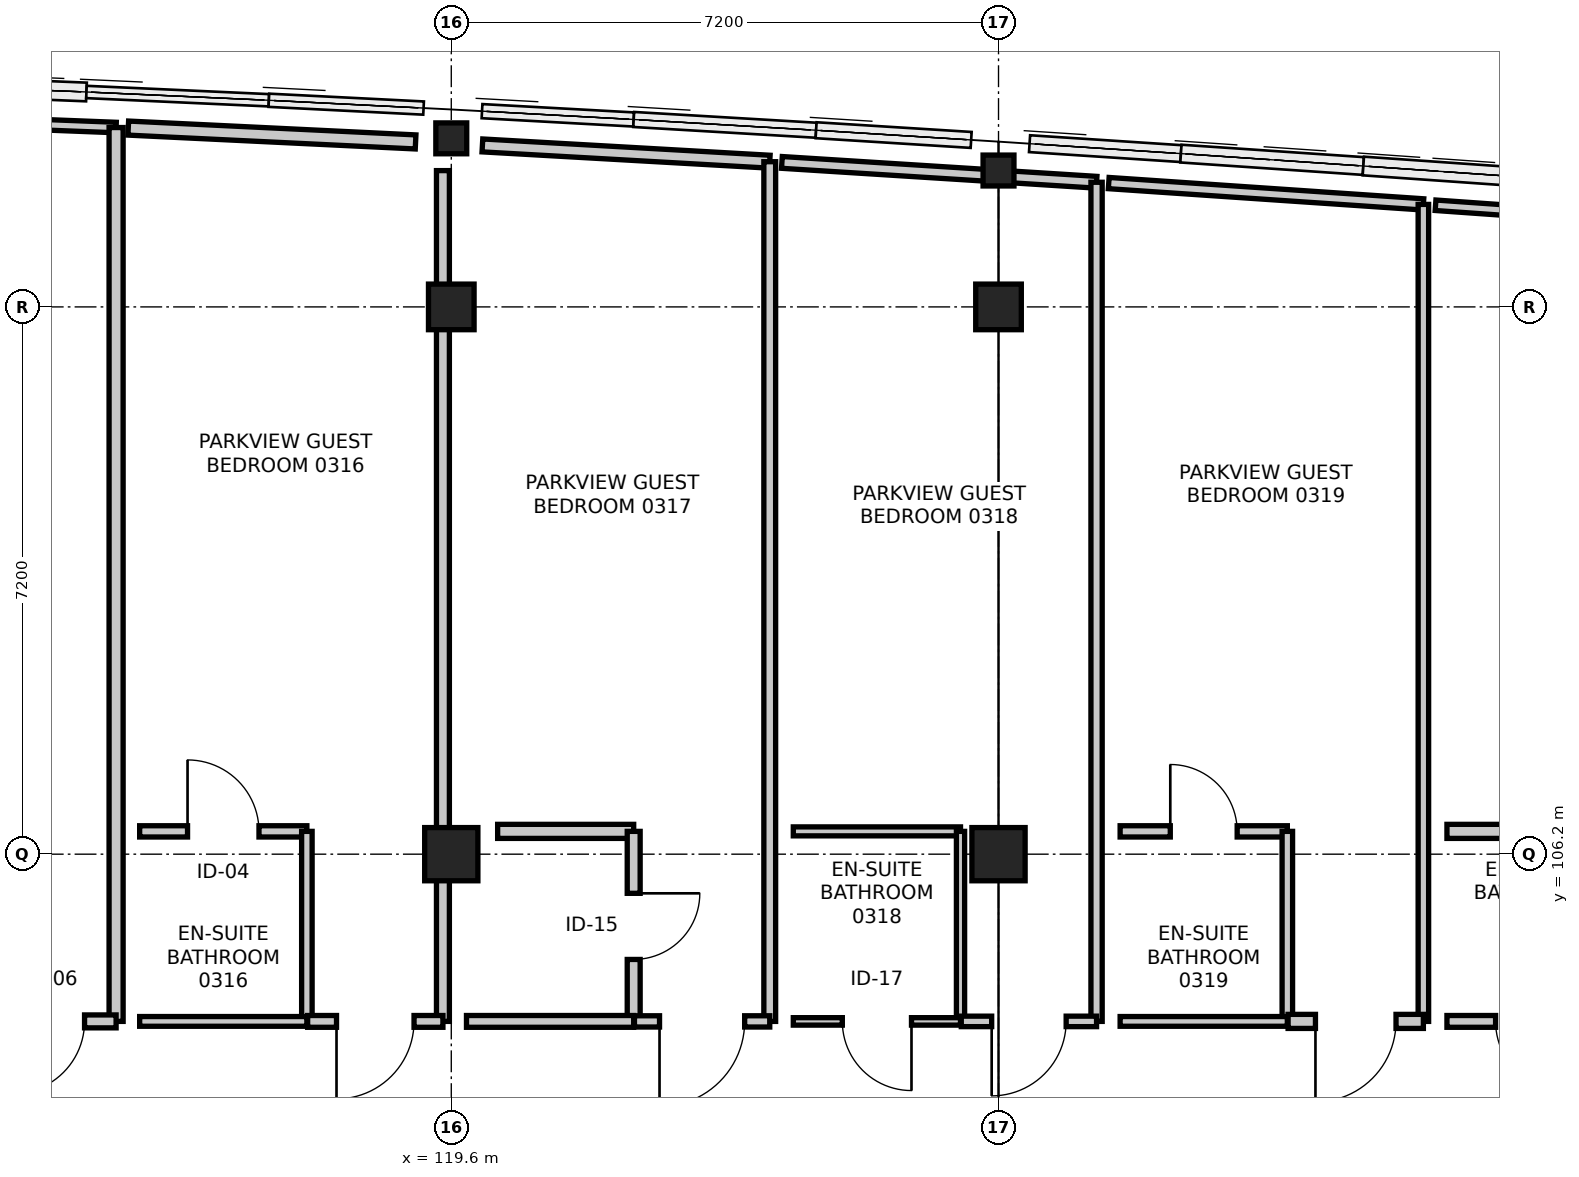
"""IFC4 building model, lengths in metres.
Left out: names, types, materials, properties, quantities, classifications, styles, units other than length and angle.
Written with IfcOpenShell. Run it as: python <this file> out.ifc"""

import sys

from ifc_helpers import new_model, si_unit, direction, frame, frame_2d, origin, origin_2d, place, context, subcontext, project, spatial, rectangle, hollow_circle, extrude, element, fill, save


model = new_model("IFC4")
c1 = context("Model", 3, precision=1e-05, world=origin(), true_north=direction((0.0, 1.0)))
c2 = subcontext(c1, "Body", "Model", "MODEL_VIEW")
j1 = project(units=[si_unit("LENGTHUNIT", "METRE"), si_unit("PLANEANGLEUNIT", "RADIAN")], contexts=[c1])
p1 = place(None, origin())
s1 = spatial("IfcSite", under=j1, at=p1, CompositionType="ELEMENT")
p2 = place(p1, origin())
s2 = spatial("IfcBuilding", under=s1, at=p2, CompositionType="ELEMENT")
p3 = place(p2, frame((0.0, 0.0, 15.0)))
s3 = spatial("IfcBuildingStorey", under=s2, at=p3, CompositionType="ELEMENT", Elevation=15.0)
p4 = place(p3, frame((119.6, 106.2, 0.0), z_axis=(0.0, 0.0, 1.0), x_axis=(1.0, 0.0, 0.0)))
e1 = element("IfcColumn", 1, at=p4, inside=s3, PredefinedType="COLUMN", context=c2, shape_type="SweptSolid", body=[
    extrude(rectangle(XDim=0.7, YDim=0.7, at=origin_2d()), origin(), (0.0, 0.0, 1.0), 4.2),
])
p5 = place(p3, frame((119.6, 113.4, 0.0), z_axis=(0.0, 0.0, 1.0), x_axis=(1.0, 0.0, 0.0)))
e2 = element("IfcColumn", 2, at=p5, inside=s3, PredefinedType="COLUMN", context=c2, shape_type="SweptSolid", body=[
    extrude(rectangle(XDim=0.6, YDim=0.6, at=origin_2d()), origin(), (0.0, 0.0, 1.0), 4.2),
])
p6 = place(p3, frame((119.6, 115.618, 0.0), z_axis=(0.0, 0.0, 1.0), x_axis=(1.0, 0.0, 0.0)))
e3 = element("IfcColumn", 3, at=p6, inside=s3, PredefinedType="COLUMN", context=c2, shape_type="SweptSolid", body=[
    extrude(hollow_circle(Radius=0.203, WallThickness=0.02, at=origin_2d()), origin(), (0.0, 0.0, 1.0), 4.2),
])
p7 = place(p3, frame((126.8, 106.2, 0.0), z_axis=(0.0, 0.0, 1.0), x_axis=(1.0, 0.0, 0.0)))
e4 = element("IfcColumn", 4, at=p7, inside=s3, PredefinedType="COLUMN", context=c2, shape_type="SweptSolid", body=[
    extrude(rectangle(XDim=0.7, YDim=0.7, at=origin_2d()), origin(), (0.0, 0.0, 1.0), 4.2),
])
p8 = place(p3, frame((126.8, 113.4, 0.0), z_axis=(0.0, 0.0, 1.0), x_axis=(1.0, 0.0, 0.0)))
e5 = element("IfcColumn", 5, at=p8, inside=s3, PredefinedType="COLUMN", context=c2, shape_type="SweptSolid", body=[
    extrude(rectangle(XDim=0.6, YDim=0.6, at=origin_2d()), origin(), (0.0, 0.0, 1.0), 4.2),
])
p9 = place(p3, frame((126.8, 115.194, 0.0), z_axis=(0.0, 0.0, 1.0), x_axis=(1.0, 0.0, 0.0)))
e6 = element("IfcColumn", 6, at=p9, inside=s3, PredefinedType="COLUMN", context=c2, shape_type="SweptSolid", body=[
    extrude(hollow_circle(Radius=0.203, WallThickness=0.02, at=origin_2d()), origin(), (0.0, 0.0, 1.0), 4.2),
])
p10 = place(p3, frame((111.05, 115.921, 0.0), z_axis=(0.0, 0.0, 1.0), x_axis=(0.999245687705, -0.038833691584, 0.0)))
e7 = element("IfcWall", 7, at=p10, inside=s3, PredefinedType="PARTITIONING", context=c2, shape_type="SweptSolid", body=[
    extrude(rectangle(XDim=4.143, YDim=0.138, at=frame_2d((2.072, 0.0))), origin(), (0.0, 0.0, 1.0), 3.516),
])
p11 = place(p3, frame((115.19, 115.76, 0.0), z_axis=(0.0, 0.0, 1.0), x_axis=(0.0, -1.0, 0.0)))
e8 = element("IfcWall", 8, at=p11, inside=s3, PredefinedType="PARTITIONING", context=c2, shape_type="SweptSolid", body=[
    extrude(rectangle(XDim=11.76, YDim=0.185, at=frame_2d((5.88, 0.0))), origin(), (0.0, 0.0, 1.0), 3.325),
])
p12 = place(p3, frame((115.19, 104.0, 0.0), z_axis=(0.0, 0.0, 1.0), x_axis=(-1.0, 0.0, 0.0)))
e9 = element("IfcWall", 9, at=p12, inside=s3, PredefinedType="PARTITIONING", context=c2, shape_type="SweptSolid", body=[
    extrude(rectangle(XDim=1.78, YDim=0.17, at=frame_2d((0.89, 0.0))), origin(), (0.0, 0.0, 1.0), 3.94),
])
p13 = place(p12, frame((0.415, 0.0, 0.0)))
e10 = element("IfcOpeningElement", 10, at=p13, cuts=e9, PredefinedType="OPENING", context=c2, shape_type="SweptSolid", body=[
    extrude(rectangle(XDim=0.95, YDim=2.1, at=frame_2d((0.475, 1.05))), frame((0.0, 0.095, 0.0), z_axis=(0.0, -1.0, 0.0), x_axis=(1.0, 0.0, 0.0)), (0.0, 0.0, 1.0), 0.19),
])
p14 = place(p3, frame((115.5, 106.5, 0.0), z_axis=(0.0, 0.0, 1.0), x_axis=(1.0, 0.0, 0.0)))
e11 = element("IfcWall", 11, at=p14, inside=s3, PredefinedType="PARTITIONING", context=c2, shape_type="SweptSolid", body=[
    extrude(rectangle(XDim=2.2, YDim=0.148, at=frame_2d((1.1, 0.0))), origin(), (0.0, 0.0, 1.0), 3.94),
])
p15 = place(p14, frame((0.63, 0.0, 0.0)))
e12 = element("IfcOpeningElement", 12, at=p15, cuts=e11, PredefinedType="OPENING", context=c2, shape_type="SweptSolid", body=[
    extrude(rectangle(XDim=0.94, YDim=2.12, at=frame_2d((0.47, 1.06))), frame((0.0, 0.084, 0.0), z_axis=(0.0, -1.0, 0.0), x_axis=(1.0, 0.0, 0.0)), (0.0, 0.0, 1.0), 0.168),
])
p16 = place(p3, frame((117.7, 106.5, 0.0), z_axis=(0.0, 0.0, 1.0), x_axis=(0.0, -1.0, 0.0)))
e13 = element("IfcWall", 13, at=p16, inside=s3, PredefinedType="PARTITIONING", context=c2, shape_type="SweptSolid", body=[
    extrude(rectangle(XDim=2.5, YDim=0.138, at=frame_2d((1.25, 0.0))), origin(), (0.0, 0.0, 1.0), 3.325),
])
p17 = place(p3, frame((117.7, 104.0, 0.0), z_axis=(0.0, 0.0, 1.0), x_axis=(-1.0, 0.0, 0.0)))
e14 = element("IfcWall", 14, at=p17, inside=s3, PredefinedType="PARTITIONING", context=c2, shape_type="SweptSolid", body=[
    extrude(rectangle(XDim=2.2, YDim=0.128, at=frame_2d((1.1, 0.0))), origin(), (0.0, 0.0, 1.0), 3.94),
])
p18 = place(p3, frame((115.35, 115.753, 0.0), z_axis=(0.0, 0.0, 1.0), x_axis=(0.99884141987, -0.048122946217, 0.0)))
e15 = element("IfcWall", 15, at=p18, inside=s3, PredefinedType="PARTITIONING", context=c2, shape_type="SweptSolid", body=[
    extrude(rectangle(XDim=3.785, YDim=0.185, at=frame_2d((1.892, 0.0))), origin(), (0.0, 0.0, 1.0), 3.516),
])
p19 = place(p3, frame((119.49, 115.193, 0.0), z_axis=(0.0, 0.0, 1.0), x_axis=(0.0, -1.0, 0.0)))
e16 = element("IfcWall", 16, at=p19, inside=s3, PredefinedType="PARTITIONING", context=c2, shape_type="SweptSolid", body=[
    extrude(rectangle(XDim=11.193, YDim=0.17, at=frame_2d((5.597, 0.0))), origin(), (0.0, 0.0, 1.0), 3.275),
])
p20 = place(p3, frame((119.49, 104.0, 0.0), z_axis=(0.0, 0.0, 1.0), x_axis=(-1.0, 0.0, 0.0)))
e17 = element("IfcWall", 17, at=p20, inside=s3, PredefinedType="PARTITIONING", context=c2, shape_type="SweptSolid", body=[
    extrude(rectangle(XDim=1.78, YDim=0.155, at=frame_2d((0.89, 0.0))), origin(), (0.0, 0.0, 1.0), 3.275),
])
p21 = place(p20, frame((0.38, 0.0, 0.0)))
e18 = element("IfcOpeningElement", 18, at=p21, cuts=e17, PredefinedType="OPENING", context=c2, shape_type="SweptSolid", body=[
    extrude(rectangle(XDim=1.02, YDim=2.15, at=frame_2d((0.51, 1.075))), frame((0.0, 0.087, 0.0), z_axis=(0.0, -1.0, 0.0), x_axis=(1.0, 0.0, 0.0)), (0.0, 0.0, 1.0), 0.175),
])
p22 = place(p3, frame((120.21, 106.5, 0.0), z_axis=(0.0, 0.0, 1.0), x_axis=(1.0, 0.0, 0.0)))
e19 = element("IfcWall", 19, at=p22, inside=s3, PredefinedType="PARTITIONING", context=c2, shape_type="SweptSolid", body=[
    extrude(rectangle(XDim=1.79, YDim=0.185, at=frame_2d((0.895, 0.0))), origin(), (0.0, 0.0, 1.0), 3.325),
])
p23 = place(p3, frame((122.0, 106.5, 0.0), z_axis=(0.0, 0.0, 1.0), x_axis=(0.0, -1.0, 0.0)))
e20 = element("IfcWall", 20, at=p23, inside=s3, PredefinedType="PARTITIONING", context=c2, shape_type="SweptSolid", body=[
    extrude(rectangle(XDim=2.5, YDim=0.17, at=frame_2d((1.25, 0.0))), origin(), (0.0, 0.0, 1.0), 3.325),
])
p24 = place(p23, frame((0.815, 0.0, 0.0)))
e21 = element("IfcOpeningElement", 21, at=p24, cuts=e20, PredefinedType="OPENING", context=c2, shape_type="SweptSolid", body=[
    extrude(rectangle(XDim=0.87, YDim=2.07, at=frame_2d((0.435, 1.035))), frame((0.0, 0.095, 0.0), z_axis=(0.0, -1.0, 0.0), x_axis=(1.0, 0.0, 0.0)), (0.0, 0.0, 1.0), 0.19),
])
p25 = place(p3, frame((122.0, 104.0, 0.0), z_axis=(0.0, 0.0, 1.0), x_axis=(-1.0, 0.0, 0.0)))
e22 = element("IfcWall", 22, at=p25, inside=s3, PredefinedType="PARTITIONING", context=c2, shape_type="SweptSolid", body=[
    extrude(rectangle(XDim=2.2, YDim=0.155, at=frame_2d((1.1, 0.0))), origin(), (0.0, 0.0, 1.0), 3.275),
])
p26 = place(p3, frame((120.01, 115.524, 0.0), z_axis=(0.0, 0.0, 1.0), x_axis=(0.998400060611, -0.056544840372, 0.0)))
e23 = element("IfcWall", 23, at=p26, inside=s3, PredefinedType="PARTITIONING", context=c2, shape_type="SweptSolid", body=[
    extrude(rectangle(XDim=3.787, YDim=0.17, at=frame_2d((1.893, 0.0))), origin(), (0.0, 0.0, 1.0), 3.516),
])
p27 = place(p3, frame((123.79, 115.31, 0.0), z_axis=(0.0, 0.0, 1.0), x_axis=(0.0, -1.0, 0.0)))
e24 = element("IfcWall", 24, at=p27, inside=s3, PredefinedType="PARTITIONING", context=c2, shape_type="SweptSolid", body=[
    extrude(rectangle(XDim=11.31, YDim=0.155, at=frame_2d((5.655, 0.0))), origin(), (0.0, 0.0, 1.0), 3.325),
])
p28 = place(p3, frame((123.79, 104.0, 0.0), z_axis=(0.0, 0.0, 1.0), x_axis=(-1.0, 0.0, 0.0)))
e25 = element("IfcWall", 25, at=p28, inside=s3, PredefinedType="PARTITIONING", context=c2, shape_type="SweptSolid", body=[
    extrude(rectangle(XDim=1.78, YDim=0.148, at=frame_2d((0.89, 0.0))), origin(), (0.0, 0.0, 1.0), 3.94),
])
p29 = place(p28, frame((0.33, 0.0, 0.0)))
e26 = element("IfcOpeningElement", 26, at=p29, cuts=e25, PredefinedType="OPENING", context=c2, shape_type="SweptSolid", body=[
    extrude(rectangle(XDim=1.12, YDim=2.2, at=frame_2d((0.56, 1.1))), frame((0.0, 0.084, 0.0), z_axis=(0.0, -1.0, 0.0), x_axis=(1.0, 0.0, 0.0)), (0.0, 0.0, 1.0), 0.168),
])
p30 = place(p3, frame((124.1, 106.5, 0.0), z_axis=(0.0, 0.0, 1.0), x_axis=(1.0, 0.0, 0.0)))
e27 = element("IfcWall", 27, at=p30, inside=s3, PredefinedType="PARTITIONING", context=c2, shape_type="SweptSolid", body=[
    extrude(rectangle(XDim=2.2, YDim=0.118, at=frame_2d((1.1, 0.0))), origin(), (0.0, 0.0, 1.0), 3.94),
])
p31 = place(p3, frame((126.3, 106.5, 0.0), z_axis=(0.0, 0.0, 1.0), x_axis=(0.0, -1.0, 0.0)))
e28 = element("IfcWall", 28, at=p31, inside=s3, PredefinedType="PARTITIONING", context=c2, shape_type="SweptSolid", body=[
    extrude(rectangle(XDim=2.5, YDim=0.108, at=frame_2d((1.25, 0.0))), origin(), (0.0, 0.0, 1.0), 3.325),
])
p32 = place(p3, frame((126.3, 104.0, 0.0), z_axis=(0.0, 0.0, 1.0), x_axis=(-1.0, 0.0, 0.0)))
e29 = element("IfcWall", 29, at=p32, inside=s3, PredefinedType="PARTITIONING", context=c2, shape_type="SweptSolid", body=[
    extrude(rectangle(XDim=2.2, YDim=0.098, at=frame_2d((1.1, 0.0))), origin(), (0.0, 0.0, 1.0), 3.94),
])
p33 = place(p32, frame((0.645, 0.0, 0.0)))
e30 = element("IfcOpeningElement", 30, at=p33, cuts=e29, PredefinedType="OPENING", context=c2, shape_type="SweptSolid", body=[
    extrude(rectangle(XDim=0.91, YDim=2.11, at=frame_2d((0.455, 1.055))), frame((0.0, 0.059, 0.0), z_axis=(0.0, -1.0, 0.0), x_axis=(1.0, 0.0, 0.0)), (0.0, 0.0, 1.0), 0.118),
])
p34 = place(p3, frame((123.95, 115.301, 0.0), z_axis=(0.0, 0.0, 1.0), x_axis=(0.998019001465, -0.062913215743, 0.0)))
e31 = element("IfcWall", 31, at=p34, inside=s3, PredefinedType="PARTITIONING", context=c2, shape_type="SweptSolid", body=[
    extrude(rectangle(XDim=4.148, YDim=0.155, at=frame_2d((2.074, 0.0))), origin(), (0.0, 0.0, 1.0), 3.516),
])
p35 = place(p3, frame((128.09, 115.04, 0.0), z_axis=(0.0, 0.0, 1.0), x_axis=(0.0, -1.0, 0.0)))
e32 = element("IfcWall", 32, at=p35, inside=s3, PredefinedType="PARTITIONING", context=c2, shape_type="SweptSolid", body=[
    extrude(rectangle(XDim=11.04, YDim=0.148, at=frame_2d((5.52, 0.0))), origin(), (0.0, 0.0, 1.0), 3.325),
])
p36 = place(p3, frame((128.09, 104.0, 0.0), z_axis=(0.0, 0.0, 1.0), x_axis=(-1.0, 0.0, 0.0)))
e33 = element("IfcWall", 33, at=p36, inside=s3, PredefinedType="PARTITIONING", context=c2, shape_type="SweptSolid", body=[
    extrude(rectangle(XDim=1.78, YDim=0.138, at=frame_2d((0.89, 0.0))), origin(), (0.0, 0.0, 1.0), 3.275),
])
p37 = place(p36, frame((0.4, 0.0, 0.0)))
e34 = element("IfcOpeningElement", 34, at=p37, cuts=e33, PredefinedType="OPENING", context=c2, shape_type="SweptSolid", body=[
    extrude(rectangle(XDim=0.98, YDim=2.15, at=frame_2d((0.49, 1.075))), frame((0.0, 0.079, 0.0), z_axis=(0.0, -1.0, 0.0), x_axis=(1.0, 0.0, 0.0)), (0.0, 0.0, 1.0), 0.158),
])
p38 = place(p3, frame((128.4, 106.5, 0.0), z_axis=(0.0, 0.0, 1.0), x_axis=(1.0, 0.0, 0.0)))
e35 = element("IfcWall", 35, at=p38, inside=s3, PredefinedType="PARTITIONING", context=c2, shape_type="SweptSolid", body=[
    extrude(rectangle(XDim=2.2, YDim=0.148, at=frame_2d((1.1, 0.0))), origin(), (0.0, 0.0, 1.0), 3.94),
])
p39 = place(p38, frame((0.66, 0.0, 0.0)))
e36 = element("IfcOpeningElement", 36, at=p39, cuts=e35, PredefinedType="OPENING", context=c2, shape_type="SweptSolid", body=[
    extrude(rectangle(XDim=0.88, YDim=2.06, at=frame_2d((0.44, 1.03))), frame((0.0, 0.084, 0.0), z_axis=(0.0, -1.0, 0.0), x_axis=(1.0, 0.0, 0.0)), (0.0, 0.0, 1.0), 0.168),
])
p40 = place(p3, frame((130.6, 106.5, 0.0), z_axis=(0.0, 0.0, 1.0), x_axis=(0.0, -1.0, 0.0)))
e37 = element("IfcWall", 37, at=p40, inside=s3, PredefinedType="PARTITIONING", context=c2, shape_type="SweptSolid", body=[
    extrude(rectangle(XDim=2.5, YDim=0.138, at=frame_2d((1.25, 0.0))), origin(), (0.0, 0.0, 1.0), 3.325),
])
p41 = place(p3, frame((130.6, 104.0, 0.0), z_axis=(0.0, 0.0, 1.0), x_axis=(-1.0, 0.0, 0.0)))
e38 = element("IfcWall", 38, at=p41, inside=s3, PredefinedType="PARTITIONING", context=c2, shape_type="SweptSolid", body=[
    extrude(rectangle(XDim=2.2, YDim=0.128, at=frame_2d((1.1, 0.0))), origin(), (0.0, 0.0, 1.0), 3.94),
])
p42 = place(p3, frame((128.25, 115.029, 0.0), z_axis=(0.0, 0.0, 1.0), x_axis=(0.997708221266, -0.067663174763, 0.0)))
e39 = element("IfcWall", 39, at=p42, inside=s3, PredefinedType="PARTITIONING", context=c2, shape_type="SweptSolid", body=[
    extrude(rectangle(XDim=4.149, YDim=0.148, at=frame_2d((2.075, 0.0))), origin(), (0.0, 0.0, 1.0), 3.516),
])
p43 = place(p3, frame((132.39, 114.749, 0.0), z_axis=(0.0, 0.0, 1.0), x_axis=(0.0, -1.0, 0.0)))
e40 = element("IfcWall", 40, at=p43, inside=s3, PredefinedType="PARTITIONING", context=c2, shape_type="SweptSolid", body=[
    extrude(rectangle(XDim=10.749, YDim=0.138, at=frame_2d((5.374, 0.0))), origin(), (0.0, 0.0, 1.0), 3.325),
])
p44 = place(p3, frame((132.39, 104.0, 0.0), z_axis=(0.0, 0.0, 1.0), x_axis=(-1.0, 0.0, 0.0)))
e41 = element("IfcWall", 41, at=p44, inside=s3, PredefinedType="PARTITIONING", context=c2, shape_type="SweptSolid", body=[
    extrude(rectangle(XDim=1.78, YDim=0.185, at=frame_2d((0.89, 0.0))), origin(), (0.0, 0.0, 1.0), 3.94),
])
p45 = place(p44, frame((0.36, 0.0, 0.0)))
e42 = element("IfcOpeningElement", 42, at=p45, cuts=e41, PredefinedType="OPENING", context=c2, shape_type="SweptSolid", body=[
    extrude(rectangle(XDim=1.06, YDim=2.2, at=frame_2d((0.53, 1.1))), frame((0.0, 0.103, 0.0), z_axis=(0.0, -1.0, 0.0), x_axis=(1.0, 0.0, 0.0)), (0.0, 0.0, 1.0), 0.205),
])
p46 = place(p3, frame((132.7, 106.5, 0.0), z_axis=(0.0, 0.0, 1.0), x_axis=(1.0, 0.0, 0.0)))
e43 = element("IfcWall", 43, at=p46, inside=s3, PredefinedType="PARTITIONING", context=c2, shape_type="SweptSolid", body=[
    extrude(rectangle(XDim=2.2, YDim=0.185, at=frame_2d((1.1, 0.0))), origin(), (0.0, 0.0, 1.0), 3.275),
])
p47 = place(p3, frame((134.9, 104.0, 0.0), z_axis=(0.0, 0.0, 1.0), x_axis=(-1.0, 0.0, 0.0)))
e44 = element("IfcWall", 44, at=p47, inside=s3, PredefinedType="PARTITIONING", context=c2, shape_type="SweptSolid", body=[
    extrude(rectangle(XDim=2.2, YDim=0.155, at=frame_2d((1.1, 0.0))), origin(), (0.0, 0.0, 1.0), 3.275),
])
p48 = place(p47, frame((0.64, 0.0, 0.0)))
e45 = element("IfcOpeningElement", 45, at=p48, cuts=e44, PredefinedType="OPENING", context=c2, shape_type="SweptSolid", body=[
    extrude(rectangle(XDim=0.92, YDim=2.1, at=frame_2d((0.46, 1.05))), frame((0.0, 0.087, 0.0), z_axis=(0.0, -1.0, 0.0), x_axis=(1.0, 0.0, 0.0)), (0.0, 0.0, 1.0), 0.175),
])
p49 = place(p3, frame((132.55, 114.737, 0.0), z_axis=(0.0, 0.0, 1.0), x_axis=(0.997505365192, -0.070590696363, 0.0)))
e46 = element("IfcWall", 46, at=p49, inside=s3, PredefinedType="PARTITIONING", context=c2, shape_type="SweptSolid", body=[
    extrude(rectangle(XDim=4.15, YDim=0.138, at=frame_2d((2.075, 0.0))), origin(), (0.0, 0.0, 1.0), 3.516),
])
p50 = place(p13, origin())
e47 = element("IfcDoor", 47, at=p50, inside=s3, OperationType="SINGLE_SWING_RIGHT", PredefinedType="DOOR", context=c2, shape_type="SweptSolid", body=[
    extrude(rectangle(XDim=0.95, YDim=2.1, at=frame_2d((0.475, 1.05))), frame((0.0, 0.025, 0.0), z_axis=(0.0, -1.0, 0.0), x_axis=(1.0, 0.0, 0.0)), (0.0, 0.0, 1.0), 0.05),
])
fill(e10, e47)
p51 = place(p15, origin())
e48 = element("IfcDoor", 48, at=p51, inside=s3, OperationType="SINGLE_SWING_LEFT", PredefinedType="DOOR", context=c2, shape_type="SweptSolid", body=[
    extrude(rectangle(XDim=0.94, YDim=2.12, at=frame_2d((0.47, 1.06))), frame((0.0, 0.025, 0.0), z_axis=(0.0, -1.0, 0.0), x_axis=(1.0, 0.0, 0.0)), (0.0, 0.0, 1.0), 0.05),
])
fill(e12, e48)
p52 = place(p21, origin())
e49 = element("IfcDoor", 49, at=p52, inside=s3, OperationType="SINGLE_SWING_RIGHT", PredefinedType="DOOR", context=c2, shape_type="SweptSolid", body=[
    extrude(rectangle(XDim=1.02, YDim=2.15, at=frame_2d((0.51, 1.075))), frame((0.0, 0.025, 0.0), z_axis=(0.0, -1.0, 0.0), x_axis=(1.0, 0.0, 0.0)), (0.0, 0.0, 1.0), 0.05),
])
fill(e18, e49)
p53 = place(p24, origin())
e50 = element("IfcDoor", 50, at=p53, inside=s3, OperationType="SINGLE_SWING_LEFT", PredefinedType="DOOR", context=c2, shape_type="SweptSolid", body=[
    extrude(rectangle(XDim=0.87, YDim=2.07, at=frame_2d((0.435, 1.035))), frame((0.0, 0.025, 0.0), z_axis=(0.0, -1.0, 0.0), x_axis=(1.0, 0.0, 0.0)), (0.0, 0.0, 1.0), 0.05),
])
fill(e21, e50)
p54 = place(p29, origin())
e51 = element("IfcDoor", 51, at=p54, inside=s3, OperationType="SINGLE_SWING_RIGHT", PredefinedType="DOOR", context=c2, shape_type="SweptSolid", body=[
    extrude(rectangle(XDim=1.12, YDim=2.2, at=frame_2d((0.56, 1.1))), frame((0.0, 0.025, 0.0), z_axis=(0.0, -1.0, 0.0), x_axis=(1.0, 0.0, 0.0)), (0.0, 0.0, 1.0), 0.05),
])
fill(e26, e51)
p55 = place(p33, origin())
e52 = element("IfcDoor", 52, at=p55, inside=s3, OperationType="SINGLE_SWING_LEFT", PredefinedType="DOOR", context=c2, shape_type="SweptSolid", body=[
    extrude(rectangle(XDim=0.91, YDim=2.11, at=frame_2d((0.455, 1.055))), frame((0.0, 0.025, 0.0), z_axis=(0.0, -1.0, 0.0), x_axis=(1.0, 0.0, 0.0)), (0.0, 0.0, 1.0), 0.05),
])
fill(e30, e52)
p56 = place(p37, origin())
e53 = element("IfcDoor", 53, at=p56, inside=s3, OperationType="SINGLE_SWING_RIGHT", PredefinedType="DOOR", context=c2, shape_type="SweptSolid", body=[
    extrude(rectangle(XDim=0.98, YDim=2.15, at=frame_2d((0.49, 1.075))), frame((0.0, 0.025, 0.0), z_axis=(0.0, -1.0, 0.0), x_axis=(1.0, 0.0, 0.0)), (0.0, 0.0, 1.0), 0.05),
])
fill(e34, e53)
p57 = place(p39, origin())
e54 = element("IfcDoor", 54, at=p57, inside=s3, OperationType="SINGLE_SWING_LEFT", PredefinedType="DOOR", context=c2, shape_type="SweptSolid", body=[
    extrude(rectangle(XDim=0.88, YDim=2.06, at=frame_2d((0.44, 1.03))), frame((0.0, 0.025, 0.0), z_axis=(0.0, -1.0, 0.0), x_axis=(1.0, 0.0, 0.0)), (0.0, 0.0, 1.0), 0.05),
])
fill(e36, e54)
p58 = place(p45, origin())
e55 = element("IfcDoor", 55, at=p58, inside=s3, OperationType="SINGLE_SWING_RIGHT", PredefinedType="DOOR", context=c2, shape_type="SweptSolid", body=[
    extrude(rectangle(XDim=1.06, YDim=2.2, at=frame_2d((0.53, 1.1))), frame((0.0, 0.025, 0.0), z_axis=(0.0, -1.0, 0.0), x_axis=(1.0, 0.0, 0.0)), (0.0, 0.0, 1.0), 0.05),
])
fill(e42, e55)
p59 = place(p48, origin())
e56 = element("IfcDoor", 56, at=p59, inside=s3, OperationType="SINGLE_SWING_LEFT", PredefinedType="DOOR", context=c2, shape_type="SweptSolid", body=[
    extrude(rectangle(XDim=0.92, YDim=2.1, at=frame_2d((0.46, 1.05))), frame((0.0, 0.025, 0.0), z_axis=(0.0, -1.0, 0.0), x_axis=(1.0, 0.0, 0.0)), (0.0, 0.0, 1.0), 0.05),
])
fill(e45, e56)
save(model, sys.argv[1])
